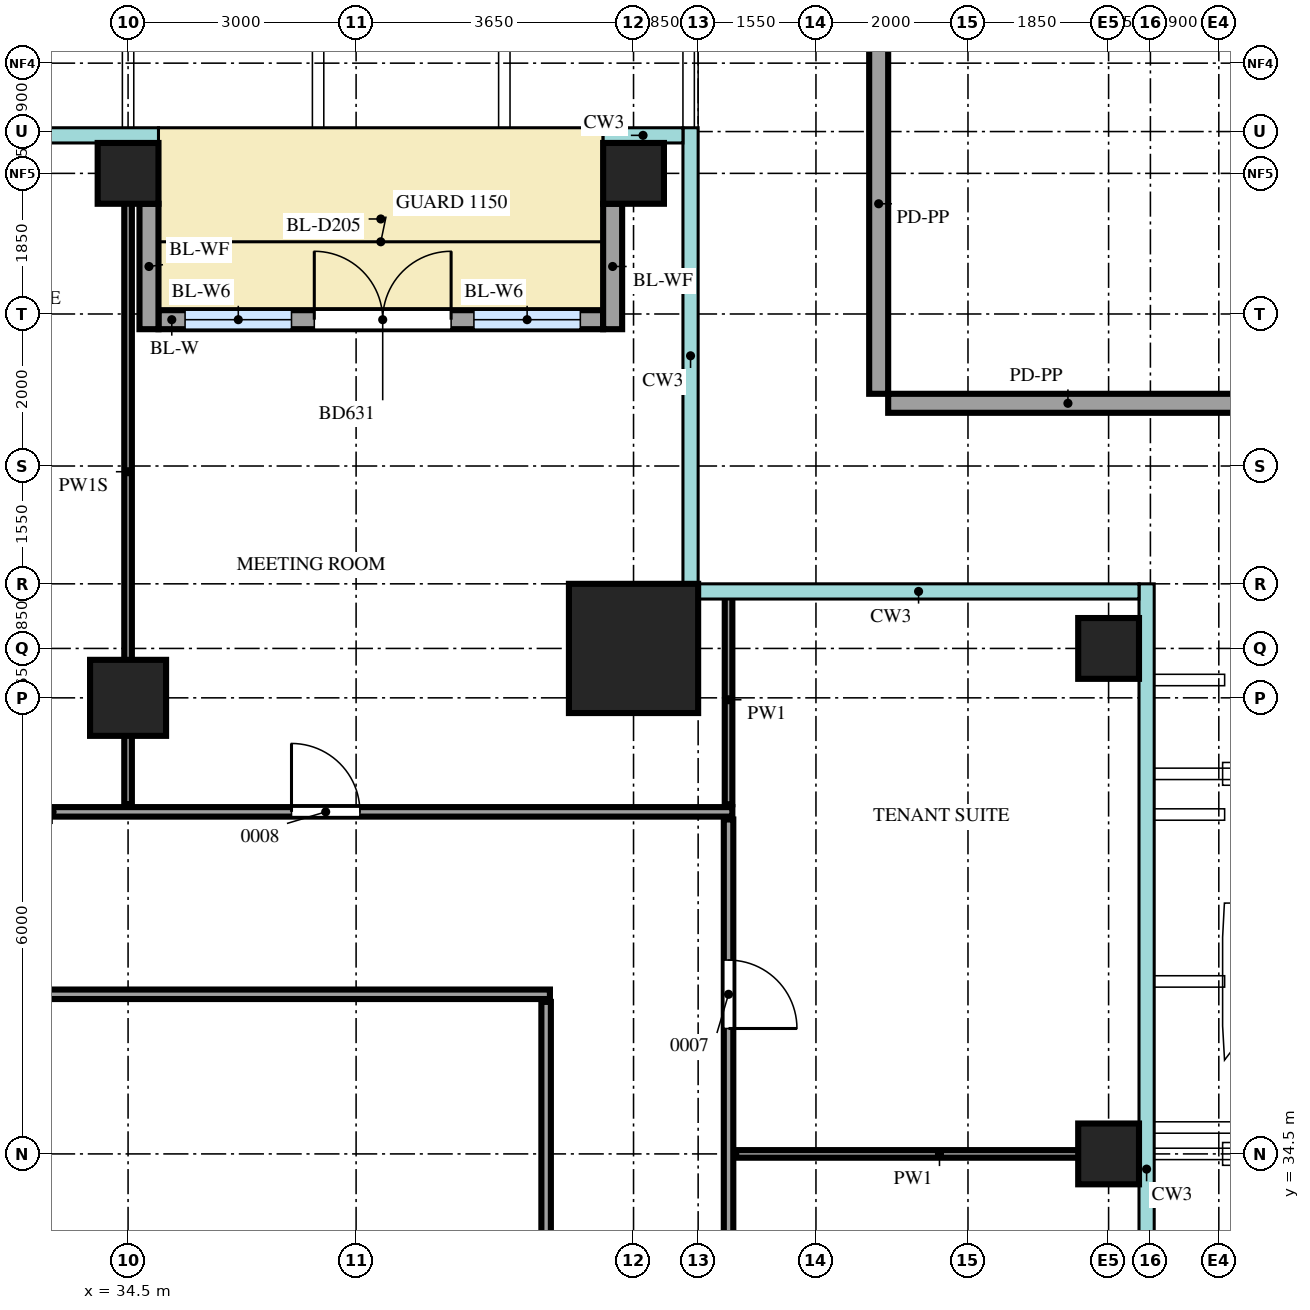
"""IFC4 building model, lengths in metres.
Left out: names, types, materials, properties, quantities, classifications, styles, units other than length and angle.
Written with IfcOpenShell. Run it as: python <this file> out.ifc"""

import sys

from ifc_helpers import new_model, si_unit, direction, frame, frame_2d, origin, origin_2d, place, context, subcontext, project, spatial, rectangle, extrude, source, transform, mapped, element, fill, save


model = new_model("IFC4")
c1 = context("Model", 3, precision=1e-05, world=origin(), true_north=direction((0.0, 1.0)))
c2 = subcontext(c1, "Body", "Model", "MODEL_VIEW")
j1 = project(units=[si_unit("LENGTHUNIT", "METRE"), si_unit("PLANEANGLEUNIT", "RADIAN")], contexts=[c1])
p1 = place(None, origin())
s1 = spatial("IfcSite", under=j1, at=p1, CompositionType="ELEMENT")
p2 = place(p1, origin())
s2 = spatial("IfcBuilding", under=s1, at=p2, CompositionType="ELEMENT")
p3 = place(p2, frame((0.0, 0.0, 282.2)))
s3 = spatial("IfcBuildingStorey", under=s2, at=p3, CompositionType="ELEMENT", Elevation=282.2)
m1 = source(origin(), c2, "Body", "SweptSolid", [
    extrude(rectangle(XDim=1.7, YDim=1.7, at=origin_2d()), origin(), (0.0, 0.0, 1.0), 3.75),
])
p4 = place(p3, frame((41.15, 41.15, 0.0), z_axis=(0.0, 0.0, 1.0), x_axis=(1.0, 0.0, 0.0)))
e1 = element("IfcColumn", 1, at=p4, inside=s3, PredefinedType="COLUMN", context=c2, shape_type="MappedRepresentation", body=[
    mapped(m1, transform((0.0, 0.0, 0.0))),
])
m2 = source(origin(), c2, "Body", "SweptSolid", [
    extrude(rectangle(XDim=0.8, YDim=0.8, at=origin_2d()), origin(), (0.0, 0.0, 1.0), 3.75),
])
for number, where, z_axis, x_axis in (
    (2, (47.4, 34.5, 0.0), (0.0, 0.0, 1.0), (1.0, 0.0, 0.0)),
    (3, (47.4, 41.15, 0.0), (0.0, 0.0, 1.0), (1.0, 0.0, 0.0)),
    (4, (34.5, 47.4, 0.0), (0.0, 0.0, 1.0), (1.0, 0.0, 0.0)),
    (5, (41.15, 47.4, 0.0), (0.0, 0.0, 1.0), (1.0, 0.0, 0.0)),
):
    element("IfcColumn", number, at=place(p3, frame(where, z_axis=z_axis, x_axis=x_axis)), inside=s3, PredefinedType="COLUMN", context=c2, shape_type="MappedRepresentation", body=[
        mapped(m2, transform((0.0, 0.0, 0.0))),
    ])
m3 = source(origin(), c2, "Body", "SweptSolid", [
    extrude(rectangle(XDim=1.0, YDim=1.0, at=origin_2d()), origin(), (0.0, 0.0, 1.0), 3.75),
])
p5 = place(p3, frame((34.5, 40.5, 0.0), z_axis=(0.0, 0.0, 1.0), x_axis=(1.0, 0.0, 0.0)))
e6 = element("IfcColumn", 6, at=p5, inside=s3, PredefinedType="COLUMN", context=c2, shape_type="MappedRepresentation", body=[
    mapped(m3, transform((0.0, 0.0, 0.0))),
])
m4 = source(origin(), c2, "Body", "SweptSolid", [
    extrude(rectangle(XDim=5.85, YDim=0.25, at=frame_2d((2.925, 0.0))), origin(), (0.0, 0.0, 1.0), 3.75),
])
p6 = place(p3, frame((34.9, 45.475, 0.0), z_axis=(0.0, 0.0, 1.0), x_axis=(1.0, 0.0, 0.0)))
e7 = element("IfcWall", 7, at=p6, inside=s3, PredefinedType="SOLIDWALL", context=c2, shape_type="MappedRepresentation", body=[
    mapped(m4, transform((0.0, 0.0, 0.0))),
])
m5 = source(origin(), c2, "Body", "SweptSolid", [
    extrude(rectangle(XDim=1.4, YDim=2.4, at=frame_2d((0.7, 1.2))), frame((0.0, 0.135, 0.0), z_axis=(0.0, -1.0, 0.0), x_axis=(1.0, 0.0, 0.0)), (0.0, 0.0, 1.0), 0.27),
])
p7 = place(p6, frame((0.35, 0.0, 0.0)))
e8 = element("IfcOpeningElement", 8, at=p7, cuts=e7, PredefinedType="OPENING", context=c2, shape_type="MappedRepresentation", body=[
    mapped(m5, transform((0.0, 0.0, 0.0))),
])
p8 = place(p6, frame((4.15, 0.0, 0.0)))
e9 = element("IfcOpeningElement", 9, at=p8, cuts=e7, PredefinedType="OPENING", context=c2, shape_type="MappedRepresentation", body=[
    mapped(m5, transform((0.0, 0.0, 0.0))),
])
m6 = source(origin(), c2, "Body", "SweptSolid", [
    extrude(rectangle(XDim=1.8, YDim=2.4, at=frame_2d((0.9, 1.2))), frame((0.0, 0.135, 0.0), z_axis=(0.0, -1.0, 0.0), x_axis=(1.0, 0.0, 0.0)), (0.0, 0.0, 1.0), 0.27),
])
p9 = place(p6, frame((2.05, 0.0, 0.0)))
e10 = element("IfcOpeningElement", 10, at=p9, cuts=e7, PredefinedType="OPENING", context=c2, shape_type="MappedRepresentation", body=[
    mapped(m6, transform((0.0, 0.0, 0.0))),
])
m7 = source(origin(), c2, "Body", "SweptSolid", [
    extrude(rectangle(XDim=1.65, YDim=0.25, at=frame_2d((0.825, 0.0))), origin(), (0.0, 0.0, 1.0), 3.45),
])
for number, where, z_axis, x_axis in (
    (11, (34.775, 47.0, 0.0), (0.0, 0.0, 1.0), (0.0, -1.0, 0.0)),
    (12, (40.875, 47.0, 0.0), (0.0, 0.0, 1.0), (0.0, -1.0, 0.0)),
):
    element("IfcWall", number, at=place(p3, frame(where, z_axis=z_axis, x_axis=x_axis)), inside=s3, PredefinedType="SOLIDWALL", context=c2, shape_type="MappedRepresentation", body=[
        mapped(m7, transform((0.0, 0.0, 0.0))),
    ])
m8 = source(origin(), c2, "Body", "SweptSolid", [
    extrude(rectangle(XDim=4.73, YDim=0.25, at=frame_2d((2.365, 0.0))), origin(), (0.0, 0.0, 1.0), 1.1),
])
p10 = place(p3, frame((49.23, 44.375, 0.0), z_axis=(0.0, 0.0, 1.0), x_axis=(-1.0, 0.0, 0.0)))
e13 = element("IfcWall", 13, at=p10, inside=s3, PredefinedType="SOLIDWALL", context=c2, shape_type="MappedRepresentation", body=[
    mapped(m8, transform((0.0, 0.0, 0.0))),
])
m9 = source(origin(), c2, "Body", "SweptSolid", [
    extrude(rectangle(XDim=5.0, YDim=0.25, at=frame_2d((2.5, 0.0))), origin(), (0.0, 0.0, 1.0), 1.1),
])
p11 = place(p3, frame((44.375, 44.5, 0.0), z_axis=(0.0, 0.0, 1.0), x_axis=(0.0, 1.0, 0.0)))
e14 = element("IfcWall", 14, at=p11, inside=s3, PredefinedType="SOLIDWALL", context=c2, shape_type="MappedRepresentation", body=[
    mapped(m9, transform((0.0, 0.0, 0.0))),
])
m10 = source(origin(), c2, "Body", "SweptSolid", [
    extrude(rectangle(XDim=23.8, YDim=0.125, at=frame_2d((11.9, 0.0))), origin(), (0.0, 0.0, 1.0), 3.8),
])
p12 = place(p3, frame((42.4, 15.1, 0.0), z_axis=(0.0, 0.0, 1.0), x_axis=(0.0, 1.0, 0.0)))
e15 = element("IfcWall", 15, at=p12, inside=s3, PredefinedType="PARTITIONING", context=c2, shape_type="MappedRepresentation", body=[
    mapped(m10, transform((0.0, 0.0, 0.0))),
])
m11 = source(origin(), c2, "Body", "SweptSolid", [
    extrude(rectangle(XDim=0.9, YDim=2.1, at=frame_2d((0.45, 1.05))), frame((0.0, 0.073, 0.0), z_axis=(0.0, -1.0, 0.0), x_axis=(1.0, 0.0, 0.0)), (0.0, 0.0, 1.0), 0.145),
])
p13 = place(p12, frame((5.3, 0.0, 0.0)))
e16 = element("IfcOpeningElement", 16, at=p13, cuts=e15, PredefinedType="OPENING", context=c2, shape_type="MappedRepresentation", body=[
    mapped(m11, transform((0.0, 0.0, 0.0))),
])
p14 = place(p12, frame((15.35, 0.0, 0.0)))
e17 = element("IfcOpeningElement", 17, at=p14, cuts=e15, PredefinedType="OPENING", context=c2, shape_type="MappedRepresentation", body=[
    mapped(m11, transform((0.0, 0.0, 0.0))),
])
p15 = place(p12, frame((21.05, 0.0, 0.0)))
e18 = element("IfcOpeningElement", 18, at=p15, cuts=e15, PredefinedType="OPENING", context=c2, shape_type="MappedRepresentation", body=[
    mapped(m11, transform((0.0, 0.0, 0.0))),
])
m12 = source(origin(), c2, "Body", "SweptSolid", [
    extrude(rectangle(XDim=19.0, YDim=0.125, at=frame_2d((9.5, 0.0))), origin(), (0.0, 0.0, 1.0), 3.8),
])
p16 = place(p3, frame((40.0, 17.5, 0.0), z_axis=(0.0, 0.0, 1.0), x_axis=(0.0, 1.0, 0.0)))
e19 = element("IfcWall", 19, at=p16, inside=s3, PredefinedType="PARTITIONING", context=c2, shape_type="MappedRepresentation", body=[
    mapped(m12, transform((0.0, 0.0, 0.0))),
])
m13 = source(origin(), c2, "Body", "SweptSolid", [
    extrude(rectangle(XDim=5.35, YDim=0.1, at=frame_2d((2.675, 0.0))), origin(), (0.0, 0.0, 1.0), 3.8),
])
p17 = place(p3, frame((42.5, 34.5, 0.0), z_axis=(0.0, 0.0, 1.0), x_axis=(1.0, 0.0, 0.0)))
e20 = element("IfcWall", 20, at=p17, inside=s3, PredefinedType="PARTITIONING", context=c2, shape_type="MappedRepresentation", body=[
    mapped(m13, transform((0.0, 0.0, 0.0))),
])
m14 = source(origin(), c2, "Body", "SweptSolid", [
    extrude(rectangle(XDim=16.7, YDim=0.125, at=frame_2d((8.35, 0.0))), origin(), (0.0, 0.0, 1.0), 3.8),
])
p18 = place(p3, frame((23.35, 36.6, 0.0), z_axis=(0.0, 0.0, 1.0), x_axis=(1.0, 0.0, 0.0)))
e21 = element("IfcWall", 21, at=p18, inside=s3, PredefinedType="PARTITIONING", context=c2, shape_type="MappedRepresentation", body=[
    mapped(m14, transform((0.0, 0.0, 0.0))),
])
p19 = place(p18, frame((8.05, 0.0, 0.0)))
e22 = element("IfcOpeningElement", 22, at=p19, cuts=e21, PredefinedType="OPENING", context=c2, shape_type="MappedRepresentation", body=[
    mapped(m11, transform((0.0, 0.0, 0.0))),
])
m15 = source(origin(), c2, "Body", "SweptSolid", [
    extrude(rectangle(XDim=12.1, YDim=0.125, at=frame_2d((6.05, 0.0))), origin(), (0.0, 0.0, 1.0), 3.8),
])
p20 = place(p3, frame((30.35, 39.0, 0.0), z_axis=(0.0, 0.0, 1.0), x_axis=(1.0, 0.0, 0.0)))
e23 = element("IfcWall", 23, at=p20, inside=s3, PredefinedType="PARTITIONING", context=c2, shape_type="MappedRepresentation", body=[
    mapped(m15, transform((0.0, 0.0, 0.0))),
])
p21 = place(p20, frame((6.3, 0.0, 0.0)))
e24 = element("IfcOpeningElement", 24, at=p21, cuts=e23, PredefinedType="OPENING", context=c2, shape_type="MappedRepresentation", body=[
    mapped(m11, transform((0.0, 0.0, 0.0))),
])
m16 = source(origin(), c2, "Body", "SweptSolid", [
    extrude(rectangle(XDim=8.75, YDim=0.1, at=frame_2d((4.375, 0.0))), origin(), (0.0, 0.0, 1.0), 3.35),
])
p22 = place(p3, frame((34.5, 39.1, 0.0), z_axis=(0.0, 0.0, 1.0), x_axis=(0.0, 1.0, 0.0)))
e25 = element("IfcWall", 25, at=p22, inside=s3, PredefinedType="PARTITIONING", context=c2, shape_type="MappedRepresentation", body=[
    mapped(m16, transform((0.0, 0.0, 0.0))),
])
m17 = source(origin(), c2, "Body", "SweptSolid", [
    extrude(rectangle(XDim=2.75, YDim=0.1, at=frame_2d((1.375, 0.0))), origin(), (0.0, 0.0, 1.0), 3.8),
])
p23 = place(p3, frame((42.4, 39.1, 0.0), z_axis=(0.0, 0.0, 1.0), x_axis=(0.0, 1.0, 0.0)))
e26 = element("IfcWall", 26, at=p23, inside=s3, PredefinedType="PARTITIONING", context=c2, shape_type="MappedRepresentation", body=[
    mapped(m17, transform((0.0, 0.0, 0.0))),
])
m18 = source(origin(), c2, "Body", "SweptSolid", [
    extrude(rectangle(XDim=1.4, YDim=2.4, at=frame_2d((0.7, 1.2))), frame((0.0, 0.03, 0.0), z_axis=(0.0, -1.0, 0.0), x_axis=(1.0, 0.0, 0.0)), (0.0, 0.0, 1.0), 0.06),
])
p24 = place(p7, origin())
e27 = element("IfcWindow", 27, at=p24, inside=s3, PartitioningType="SINGLE_PANEL", PredefinedType="WINDOW", context=c2, shape_type="MappedRepresentation", body=[
    mapped(m18, transform((0.0, 0.0, 0.0))),
])
fill(e8, e27)
p25 = place(p8, origin())
e28 = element("IfcWindow", 28, at=p25, inside=s3, PartitioningType="SINGLE_PANEL", PredefinedType="WINDOW", context=c2, shape_type="MappedRepresentation", body=[
    mapped(m18, transform((0.0, 0.0, 0.0))),
])
fill(e9, e28)
m19 = source(origin(), c2, "Body", "SweptSolid", [
    extrude(rectangle(XDim=1.8, YDim=2.4, at=frame_2d((0.9, 1.2))), frame((0.0, 0.025, 0.0), z_axis=(0.0, -1.0, 0.0), x_axis=(1.0, 0.0, 0.0)), (0.0, 0.0, 1.0), 0.05),
])
p26 = place(p9, origin())
e29 = element("IfcDoor", 29, at=p26, inside=s3, OperationType="DOUBLE_DOOR_DOUBLE_SWING", PredefinedType="DOOR", context=c2, shape_type="MappedRepresentation", body=[
    mapped(m19, transform((0.0, 0.0, 0.0))),
])
fill(e10, e29)
m20 = source(origin(), c2, "Body", "SweptSolid", [
    extrude(rectangle(XDim=0.9, YDim=2.1, at=frame_2d((0.45, 1.05))), frame((0.0, 0.025, 0.0), z_axis=(0.0, -1.0, 0.0), x_axis=(1.0, 0.0, 0.0)), (0.0, 0.0, 1.0), 0.05),
])
p27 = place(p15, origin())
e30 = element("IfcDoor", 30, at=p27, inside=s3, OperationType="SINGLE_SWING_LEFT", PredefinedType="DOOR", context=c2, shape_type="MappedRepresentation", body=[
    mapped(m20, transform((0.0, 0.0, 0.0))),
])
fill(e18, e30)
p28 = place(p21, origin())
e31 = element("IfcDoor", 31, at=p28, inside=s3, OperationType="SINGLE_SWING_RIGHT", PredefinedType="DOOR", context=c2, shape_type="MappedRepresentation", body=[
    mapped(m20, transform((0.0, 0.0, 0.0))),
])
fill(e24, e31)
save(model, sys.argv[1])
